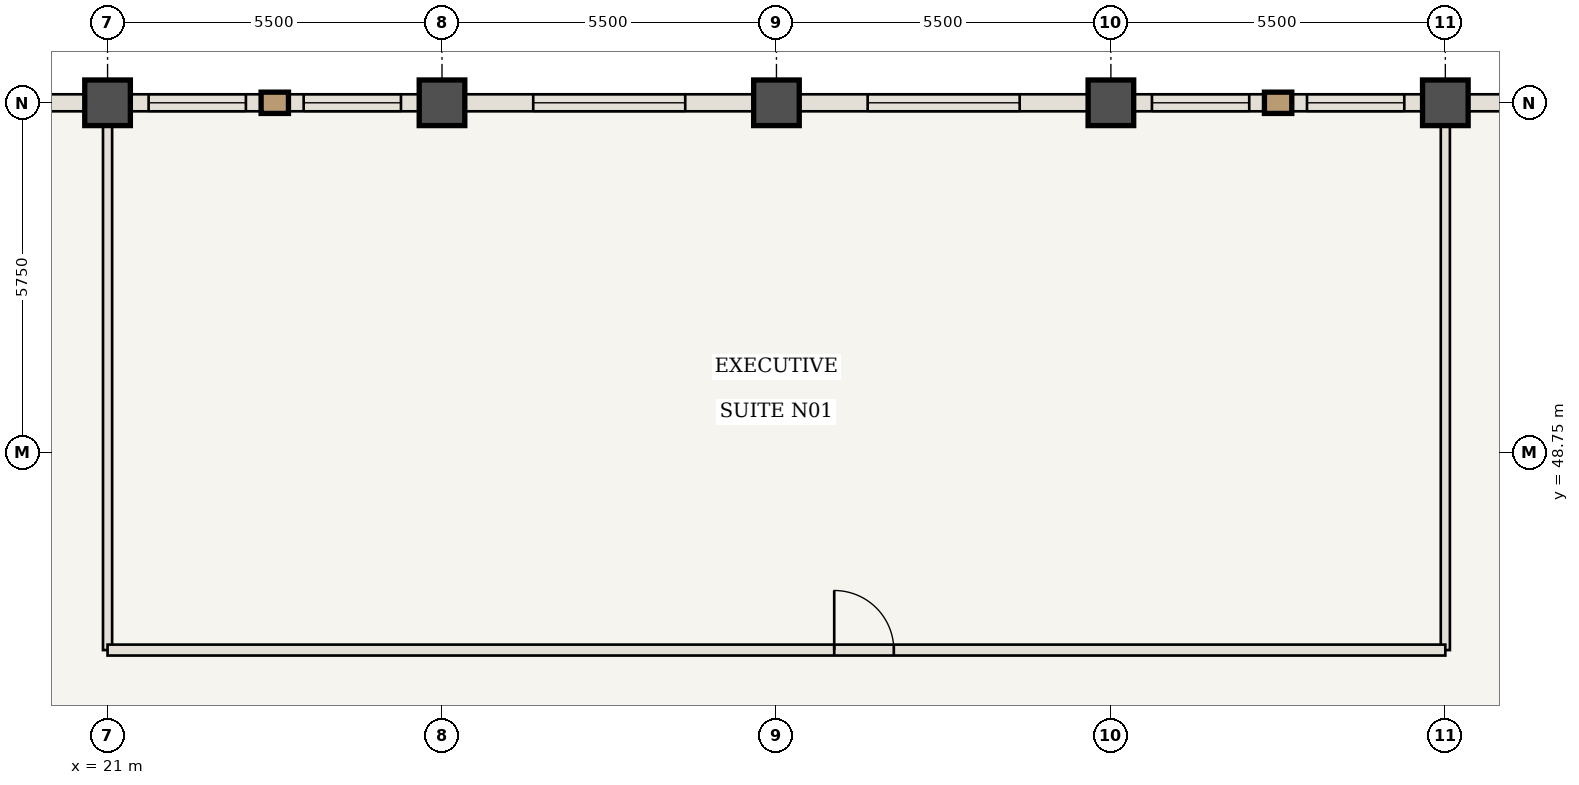
"""IFC4 building model, lengths in metres.
Left out: names, types, materials, properties, quantities, classifications, styles, units other than length and angle.
Written with IfcOpenShell. Run it as: python <this file> out.ifc"""

import sys

from ifc_helpers import new_model, si_unit, direction, frame, frame_2d, origin, origin_2d, place, context, subcontext, project, spatial, rectangle, extrude, element, fill, save


model = new_model("IFC4")
c1 = context("Model", 3, precision=1e-05, world=origin(), true_north=direction((0.0, 1.0)))
c2 = subcontext(c1, "Body", "Model", "MODEL_VIEW")
j1 = project(units=[si_unit("LENGTHUNIT", "METRE"), si_unit("PLANEANGLEUNIT", "RADIAN")], contexts=[c1])
p1 = place(None, origin())
s1 = spatial("IfcSite", under=j1, at=p1, CompositionType="ELEMENT")
p2 = place(p1, origin())
s2 = spatial("IfcBuilding", under=s1, at=p2, CompositionType="ELEMENT")
p3 = place(p2, frame((0.0, 0.0, 296.8)))
s3 = spatial("IfcBuildingStorey", under=s2, at=p3, CompositionType="ELEMENT", Elevation=296.8)
for number, where, z_axis, x_axis in (
    (1, (21.0, 54.5, 0.0), (0.0, 0.0, 1.0), (1.0, 0.0, 0.0)),
    (2, (26.5, 54.5, 0.0), (0.0, 0.0, 1.0), (1.0, 0.0, 0.0)),
    (3, (32.0, 54.5, 0.0), (0.0, 0.0, 1.0), (1.0, 0.0, 0.0)),
    (4, (37.5, 54.5, 0.0), (0.0, 0.0, 1.0), (1.0, 0.0, 0.0)),
    (5, (43.0, 54.5, 0.0), (0.0, 0.0, 1.0), (1.0, 0.0, 0.0)),
):
    element("IfcColumn", number, at=place(p3, frame(where, z_axis=z_axis, x_axis=x_axis)), inside=s3, PredefinedType="COLUMN", context=c2, shape_type="SweptSolid", body=[
        extrude(rectangle(XDim=0.75, YDim=0.75, at=origin_2d()), origin(), (0.0, 0.0, 1.0), 3.85),
    ])
for number, where, z_axis, x_axis in (
    (6, (21.0, 45.5, 0.0), (0.0, 0.0, 1.0), (0.0, 1.0, 0.0)),
    (7, (43.0, 45.5, 0.0), (0.0, 0.0, 1.0), (0.0, 1.0, 0.0)),
):
    element("IfcWall", number, at=place(p3, frame(where, z_axis=z_axis, x_axis=x_axis)), inside=s3, PredefinedType="STANDARD", context=c2, shape_type="SweptSolid", body=[
        extrude(rectangle(XDim=8.94, YDim=0.15, at=frame_2d((4.47, 0.0))), origin(), (0.0, 0.0, 1.0), 3.685),
    ])
p4 = place(p3, frame((21.0, 45.5, 0.0), z_axis=(0.0, 0.0, 1.0), x_axis=(1.0, 0.0, 0.0)))
e8 = element("IfcWall", 8, at=p4, inside=s3, PredefinedType="STANDARD", context=c2, shape_type="SweptSolid", body=[
    extrude(rectangle(XDim=22.0, YDim=0.18, at=frame_2d((11.0, 0.0))), origin(), (0.0, 0.0, 1.0), 3.685),
])
p5 = place(p4, frame((11.95, 0.0, 0.0)))
e9 = element("IfcOpeningElement", 9, at=p5, cuts=e8, PredefinedType="OPENING", context=c2, shape_type="SweptSolid", body=[
    extrude(rectangle(XDim=0.98, YDim=2.2, at=frame_2d((0.49, 1.1))), frame((0.0, 0.1, 0.0), z_axis=(0.0, -1.0, 0.0), x_axis=(1.0, 0.0, 0.0)), (0.0, 0.0, 1.0), 0.2),
])
p6 = place(p3, frame((15.5, 54.5, 0.0), z_axis=(0.0, 0.0, 1.0), x_axis=(1.0, 0.0, 0.0)))
e10 = element("IfcWall", 10, at=p6, inside=s3, PredefinedType="USERDEFINED", context=c2, shape_type="SweptSolid", body=[
    extrude(rectangle(XDim=5.5, YDim=0.28, at=frame_2d((2.75, 0.0))), origin(), (0.0, 0.0, 1.0), 2.985),
])
p7 = place(p3, frame((21.0, 54.5, 0.0), z_axis=(0.0, 0.0, 1.0), x_axis=(1.0, 0.0, 0.0)))
e11 = element("IfcWall", 11, at=p7, inside=s3, PredefinedType="USERDEFINED", context=c2, shape_type="SweptSolid", body=[
    extrude(rectangle(XDim=5.5, YDim=0.28, at=frame_2d((2.75, 0.0))), origin(), (0.0, 0.0, 1.0), 2.985),
])
p8 = place(p7, frame((0.675, 0.0, 0.85)))
e12 = element("IfcOpeningElement", 12, at=p8, cuts=e11, PredefinedType="OPENING", context=c2, shape_type="SweptSolid", body=[
    extrude(rectangle(XDim=1.6, YDim=1.935, at=frame_2d((0.8, 0.968))), frame((0.0, 0.15, 0.0), z_axis=(0.0, -1.0, 0.0), x_axis=(1.0, 0.0, 0.0)), (0.0, 0.0, 1.0), 0.3),
])
p9 = place(p7, frame((3.225, 0.0, 0.85)))
e13 = element("IfcOpeningElement", 13, at=p9, cuts=e11, PredefinedType="OPENING", context=c2, shape_type="SweptSolid", body=[
    extrude(rectangle(XDim=1.6, YDim=1.935, at=frame_2d((0.8, 0.968))), frame((0.0, 0.15, 0.0), z_axis=(0.0, -1.0, 0.0), x_axis=(1.0, 0.0, 0.0)), (0.0, 0.0, 1.0), 0.3),
])
p10 = place(p3, frame((26.5, 54.5, 0.0), z_axis=(0.0, 0.0, 1.0), x_axis=(1.0, 0.0, 0.0)))
e14 = element("IfcWall", 14, at=p10, inside=s3, PredefinedType="USERDEFINED", context=c2, shape_type="SweptSolid", body=[
    extrude(rectangle(XDim=5.5, YDim=0.28, at=frame_2d((2.75, 0.0))), origin(), (0.0, 0.0, 1.0), 2.985),
])
p11 = place(p10, frame((1.5, 0.0, 0.85)))
e15 = element("IfcOpeningElement", 15, at=p11, cuts=e14, PredefinedType="OPENING", context=c2, shape_type="SweptSolid", body=[
    extrude(rectangle(XDim=2.5, YDim=1.935, at=frame_2d((1.25, 0.968))), frame((0.0, 0.15, 0.0), z_axis=(0.0, -1.0, 0.0), x_axis=(1.0, 0.0, 0.0)), (0.0, 0.0, 1.0), 0.3),
])
p12 = place(p3, frame((32.0, 54.5, 0.0), z_axis=(0.0, 0.0, 1.0), x_axis=(1.0, 0.0, 0.0)))
e16 = element("IfcWall", 16, at=p12, inside=s3, PredefinedType="USERDEFINED", context=c2, shape_type="SweptSolid", body=[
    extrude(rectangle(XDim=5.5, YDim=0.28, at=frame_2d((2.75, 0.0))), origin(), (0.0, 0.0, 1.0), 2.985),
])
p13 = place(p12, frame((1.5, 0.0, 0.85)))
e17 = element("IfcOpeningElement", 17, at=p13, cuts=e16, PredefinedType="OPENING", context=c2, shape_type="SweptSolid", body=[
    extrude(rectangle(XDim=2.5, YDim=1.935, at=frame_2d((1.25, 0.968))), frame((0.0, 0.15, 0.0), z_axis=(0.0, -1.0, 0.0), x_axis=(1.0, 0.0, 0.0)), (0.0, 0.0, 1.0), 0.3),
])
p14 = place(p3, frame((37.5, 54.5, 0.0), z_axis=(0.0, 0.0, 1.0), x_axis=(1.0, 0.0, 0.0)))
e18 = element("IfcWall", 18, at=p14, inside=s3, PredefinedType="USERDEFINED", context=c2, shape_type="SweptSolid", body=[
    extrude(rectangle(XDim=5.5, YDim=0.28, at=frame_2d((2.75, 0.0))), origin(), (0.0, 0.0, 1.0), 2.985),
])
p15 = place(p14, frame((0.675, 0.0, 0.85)))
e19 = element("IfcOpeningElement", 19, at=p15, cuts=e18, PredefinedType="OPENING", context=c2, shape_type="SweptSolid", body=[
    extrude(rectangle(XDim=1.6, YDim=1.935, at=frame_2d((0.8, 0.968))), frame((0.0, 0.15, 0.0), z_axis=(0.0, -1.0, 0.0), x_axis=(1.0, 0.0, 0.0)), (0.0, 0.0, 1.0), 0.3),
])
p16 = place(p14, frame((3.225, 0.0, 0.85)))
e20 = element("IfcOpeningElement", 20, at=p16, cuts=e18, PredefinedType="OPENING", context=c2, shape_type="SweptSolid", body=[
    extrude(rectangle(XDim=1.6, YDim=1.935, at=frame_2d((0.8, 0.968))), frame((0.0, 0.15, 0.0), z_axis=(0.0, -1.0, 0.0), x_axis=(1.0, 0.0, 0.0)), (0.0, 0.0, 1.0), 0.3),
])
p17 = place(p3, frame((43.0, 54.5, 0.0), z_axis=(0.0, 0.0, 1.0), x_axis=(1.0, 0.0, 0.0)))
e21 = element("IfcWall", 21, at=p17, inside=s3, PredefinedType="USERDEFINED", context=c2, shape_type="SweptSolid", body=[
    extrude(rectangle(XDim=5.5, YDim=0.28, at=frame_2d((2.75, 0.0))), origin(), (0.0, 0.0, 1.0), 2.985),
])
p18 = place(p5, origin())
e22 = element("IfcDoor", 22, at=p18, inside=s3, OperationType="SINGLE_SWING_LEFT", PredefinedType="DOOR", context=c2, shape_type="SweptSolid", body=[
    extrude(rectangle(XDim=0.98, YDim=2.2, at=frame_2d((0.49, 1.1))), frame((0.0, 0.025, 0.0), z_axis=(0.0, -1.0, 0.0), x_axis=(1.0, 0.0, 0.0)), (0.0, 0.0, 1.0), 0.05),
])
fill(e9, e22)
p19 = place(p8, origin())
e23 = element("IfcWindow", 23, at=p19, inside=s3, PartitioningType="SINGLE_PANEL", PredefinedType="WINDOW", context=c2, shape_type="SweptSolid", body=[
    extrude(rectangle(XDim=1.6, YDim=1.935, at=frame_2d((0.8, 0.968))), frame((0.0, 0.03, 0.0), z_axis=(0.0, -1.0, 0.0), x_axis=(1.0, 0.0, 0.0)), (0.0, 0.0, 1.0), 0.06),
])
fill(e12, e23)
p20 = place(p9, origin())
e24 = element("IfcWindow", 24, at=p20, inside=s3, PartitioningType="SINGLE_PANEL", PredefinedType="WINDOW", context=c2, shape_type="SweptSolid", body=[
    extrude(rectangle(XDim=1.6, YDim=1.935, at=frame_2d((0.8, 0.968))), frame((0.0, 0.03, 0.0), z_axis=(0.0, -1.0, 0.0), x_axis=(1.0, 0.0, 0.0)), (0.0, 0.0, 1.0), 0.06),
])
fill(e13, e24)
p21 = place(p11, origin())
e25 = element("IfcWindow", 25, at=p21, inside=s3, PartitioningType="SINGLE_PANEL", PredefinedType="WINDOW", context=c2, shape_type="SweptSolid", body=[
    extrude(rectangle(XDim=2.5, YDim=1.935, at=frame_2d((1.25, 0.968))), frame((0.0, 0.03, 0.0), z_axis=(0.0, -1.0, 0.0), x_axis=(1.0, 0.0, 0.0)), (0.0, 0.0, 1.0), 0.06),
])
fill(e15, e25)
p22 = place(p13, origin())
e26 = element("IfcWindow", 26, at=p22, inside=s3, PartitioningType="SINGLE_PANEL", PredefinedType="WINDOW", context=c2, shape_type="SweptSolid", body=[
    extrude(rectangle(XDim=2.5, YDim=1.935, at=frame_2d((1.25, 0.968))), frame((0.0, 0.03, 0.0), z_axis=(0.0, -1.0, 0.0), x_axis=(1.0, 0.0, 0.0)), (0.0, 0.0, 1.0), 0.06),
])
fill(e17, e26)
p23 = place(p15, origin())
e27 = element("IfcWindow", 27, at=p23, inside=s3, PartitioningType="SINGLE_PANEL", PredefinedType="WINDOW", context=c2, shape_type="SweptSolid", body=[
    extrude(rectangle(XDim=1.6, YDim=1.935, at=frame_2d((0.8, 0.968))), frame((0.0, 0.03, 0.0), z_axis=(0.0, -1.0, 0.0), x_axis=(1.0, 0.0, 0.0)), (0.0, 0.0, 1.0), 0.06),
])
fill(e19, e27)
p24 = place(p16, origin())
e28 = element("IfcWindow", 28, at=p24, inside=s3, PartitioningType="SINGLE_PANEL", PredefinedType="WINDOW", context=c2, shape_type="SweptSolid", body=[
    extrude(rectangle(XDim=1.6, YDim=1.935, at=frame_2d((0.8, 0.968))), frame((0.0, 0.03, 0.0), z_axis=(0.0, -1.0, 0.0), x_axis=(1.0, 0.0, 0.0)), (0.0, 0.0, 1.0), 0.06),
])
fill(e20, e28)
save(model, sys.argv[1])
